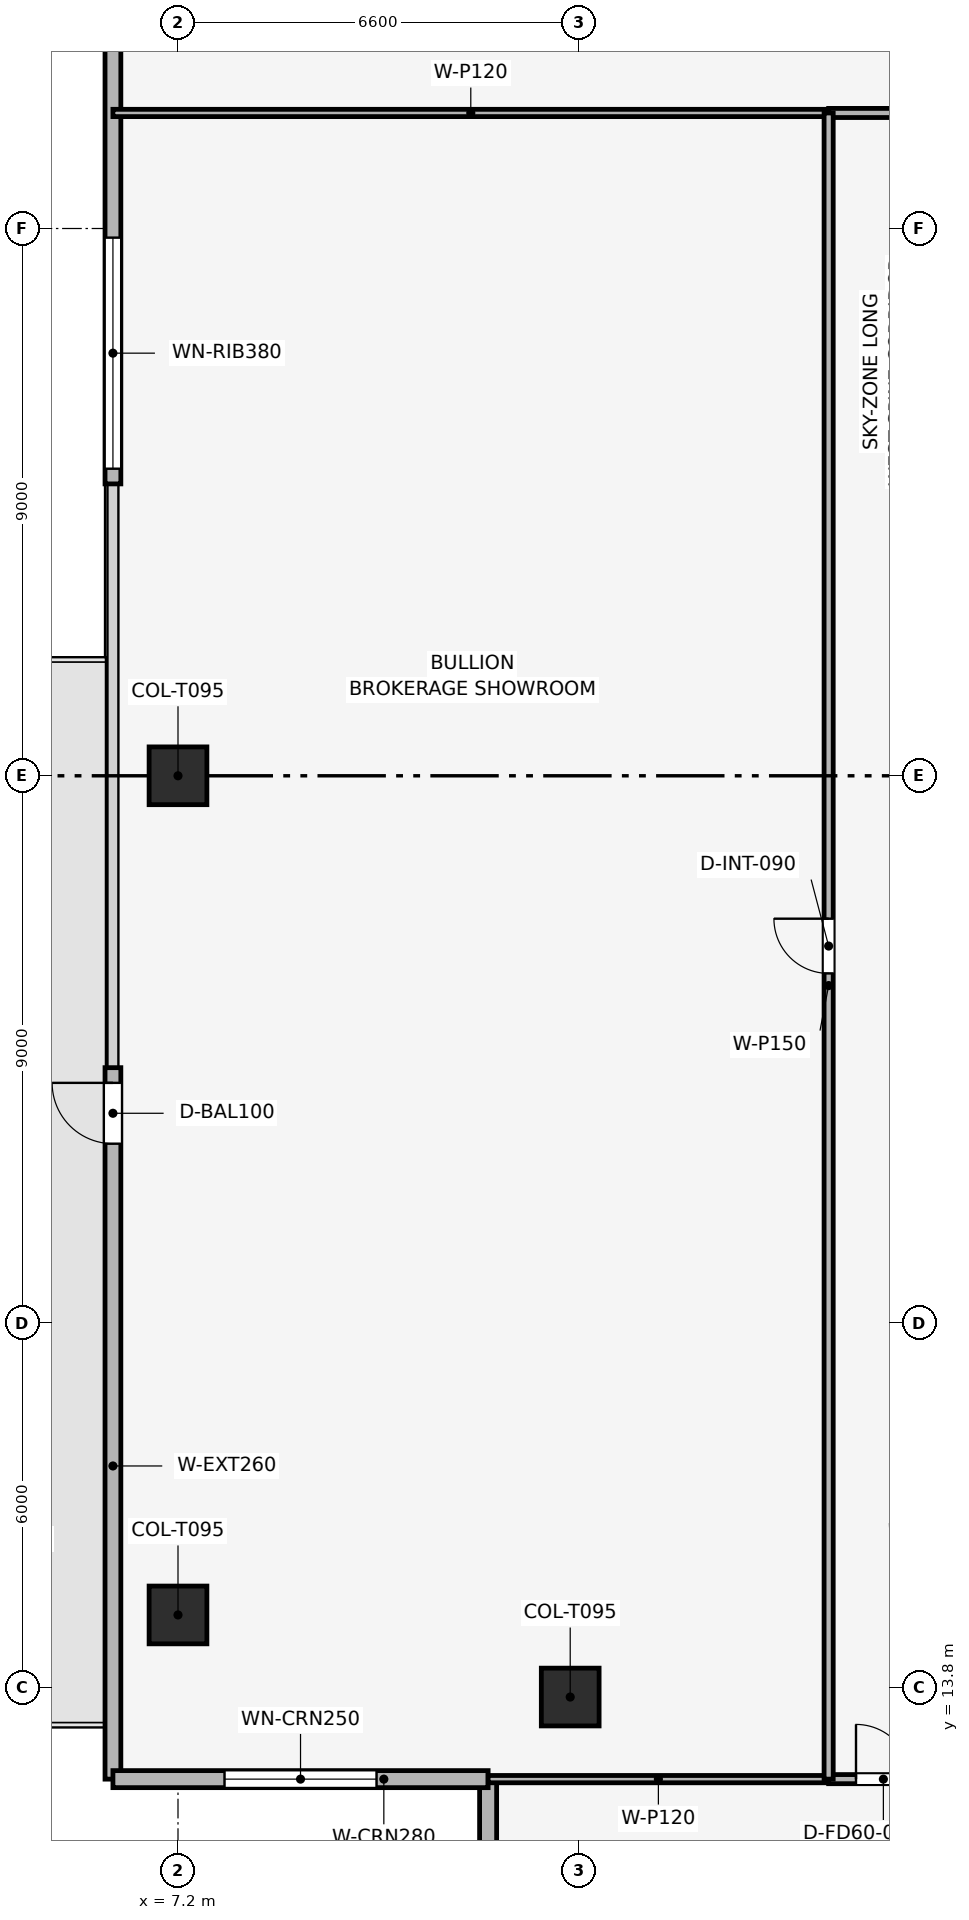
"""IFC4 building model, lengths in metres.
Left out: names, types, materials, properties, quantities, classifications, styles, units other than length and angle.
Written with IfcOpenShell. Run it as: python <this file> out.ifc"""

import sys

from ifc_helpers import new_model, si_unit, direction, frame, frame_2d, origin, origin_2d, place, context, subcontext, project, spatial, rectangle, extrude, element, fill, save


model = new_model("IFC4")
c1 = context("Model", 3, precision=1e-05, world=origin(), true_north=direction((0.0, 1.0)))
c2 = subcontext(c1, "Body", "Model", "MODEL_VIEW")
j1 = project(units=[si_unit("LENGTHUNIT", "METRE"), si_unit("PLANEANGLEUNIT", "RADIAN")], contexts=[c1])
p1 = place(None, origin())
s1 = spatial("IfcSite", under=j1, at=p1, CompositionType="ELEMENT")
p2 = place(p1, origin())
s2 = spatial("IfcBuilding", under=s1, at=p2, CompositionType="ELEMENT")
p3 = place(p2, frame((0.0, 0.0, 318.0)))
s3 = spatial("IfcBuildingStorey", under=s2, at=p3, CompositionType="ELEMENT", Elevation=318.0)
for number, where, z_axis, x_axis in (
    (1, (7.2, 28.8, 0.003), (0.0, 0.0, 1.0), (1.0, 0.0, 0.0)),
    (2, (7.2, 15.0, 0.003), (0.0, 0.0, 1.0), (1.0, 0.0, 0.0)),
    (3, (13.65, 13.65, 0.003), (0.0, 0.0, 1.0), (1.0, 0.0, 0.0)),
):
    element("IfcColumn", number, at=place(p3, frame(where, z_axis=z_axis, x_axis=x_axis)), inside=s3, PredefinedType="COLUMN", context=c2, shape_type="SweptSolid", body=[
        extrude(rectangle(XDim=0.95, YDim=0.95, at=origin_2d()), origin(), (0.0, 0.0, 1.0), 3.504),
    ])
p4 = place(p3, frame((6.13, 12.3, 0.0), z_axis=(0.0, 0.0, 1.0), x_axis=(0.0, 1.0, 0.0)))
e4 = element("IfcWall", 4, at=p4, inside=s3, PredefinedType="SOLIDWALL", context=c2, shape_type="SweptSolid", body=[
    extrude(rectangle(XDim=11.7, YDim=0.26, at=frame_2d((5.85, 0.0))), origin(), (0.0, 0.0, 1.0), 3.51),
])
p5 = place(p4, frame((10.45, 0.0, 0.0)))
e5 = element("IfcOpeningElement", 5, at=p5, cuts=e4, PredefinedType="OPENING", context=c2, shape_type="SweptSolid", body=[
    extrude(rectangle(XDim=1.0, YDim=2.2, at=frame_2d((0.5, 1.1))), frame((0.0, 0.14, 0.0), z_axis=(0.0, -1.0, 0.0), x_axis=(1.0, 0.0, 0.0)), (0.0, 0.0, 1.0), 0.28),
])
p6 = place(p3, frame((6.13, 33.6, 0.0), z_axis=(0.0, 0.0, 1.0), x_axis=(0.0, 1.0, 0.0)))
e6 = element("IfcWall", 6, at=p6, inside=s3, PredefinedType="SOLIDWALL", context=c2, shape_type="SweptSolid", body=[
    extrude(rectangle(XDim=11.7, YDim=0.26, at=frame_2d((5.85, 0.0))), origin(), (0.0, 0.0, 1.0), 3.51),
])
p7 = place(p6, frame((0.25, 0.0, 0.9)))
e7 = element("IfcOpeningElement", 7, at=p7, cuts=e6, PredefinedType="OPENING", context=c2, shape_type="SweptSolid", body=[
    extrude(rectangle(XDim=3.8, YDim=1.9, at=frame_2d((1.9, 0.95))), frame((0.0, 0.14, 0.0), z_axis=(0.0, -1.0, 0.0), x_axis=(1.0, 0.0, 0.0)), (0.0, 0.0, 1.0), 0.28),
])
p8 = place(p3, frame((12.3, 6.13, 0.0), z_axis=(0.0, 0.0, 1.0), x_axis=(0.0, 1.0, 0.0)))
e8 = element("IfcWall", 8, at=p8, inside=s3, PredefinedType="SOLIDWALL", context=c2, shape_type="SweptSolid", body=[
    extrude(rectangle(XDim=6.17, YDim=0.28, at=frame_2d((3.085, 0.0))), origin(), (0.0, 0.0, 1.0), 3.51),
])
p9 = place(p8, frame((1.835, 0.0, 0.9)))
e9 = element("IfcOpeningElement", 9, at=p9, cuts=e8, PredefinedType="OPENING", context=c2, shape_type="SweptSolid", body=[
    extrude(rectangle(XDim=2.5, YDim=1.9, at=frame_2d((1.25, 0.95))), frame((0.0, 0.15, 0.0), z_axis=(0.0, -1.0, 0.0), x_axis=(1.0, 0.0, 0.0)), (0.0, 0.0, 1.0), 0.3),
])
p10 = place(p3, frame((12.3, 12.3, 0.0), z_axis=(0.0, 0.0, 1.0), x_axis=(-1.0, 0.0, 0.0)))
e10 = element("IfcWall", 10, at=p10, inside=s3, PredefinedType="SOLIDWALL", context=c2, shape_type="SweptSolid", body=[
    extrude(rectangle(XDim=6.17, YDim=0.28, at=frame_2d((3.085, 0.0))), origin(), (0.0, 0.0, 1.0), 3.51),
])
p11 = place(p10, frame((1.835, 0.0, 0.9)))
e11 = element("IfcOpeningElement", 11, at=p11, cuts=e10, PredefinedType="OPENING", context=c2, shape_type="SweptSolid", body=[
    extrude(rectangle(XDim=2.5, YDim=1.9, at=frame_2d((1.25, 0.95))), frame((0.0, 0.15, 0.0), z_axis=(0.0, -1.0, 0.0), x_axis=(1.0, 0.0, 0.0)), (0.0, 0.0, 1.0), 0.3),
])
p12 = place(p3, frame((12.3, 12.3, 0.0), z_axis=(0.0, 0.0, 1.0), x_axis=(1.0, 0.0, 0.0)))
e12 = element("IfcWall", 12, at=p12, inside=s3, PredefinedType="PARTITIONING", context=c2, shape_type="SweptSolid", body=[
    extrude(rectangle(XDim=5.6, YDim=0.12, at=frame_2d((2.8, 0.0))), origin(), (0.0, 0.0, 1.0), 3.195),
])
p13 = place(p3, frame((17.9, 12.3, 0.0), z_axis=(0.0, 0.0, 1.0), x_axis=(1.0, 0.0, 0.0)))
e13 = element("IfcWall", 13, at=p13, inside=s3, PredefinedType="PARTITIONING", context=c2, shape_type="SweptSolid", body=[
    extrude(rectangle(XDim=1.9, YDim=0.15, at=frame_2d((0.95, 0.0))), origin(), (0.0, 0.0, 1.0), 3.51),
])
p14 = place(p13, frame((0.45, 0.0, 0.0)))
e14 = element("IfcOpeningElement", 14, at=p14, cuts=e13, PredefinedType="OPENING", context=c2, shape_type="SweptSolid", body=[
    extrude(rectangle(XDim=0.9, YDim=2.1, at=frame_2d((0.45, 1.05))), frame((0.0, 0.085, 0.0), z_axis=(0.0, -1.0, 0.0), x_axis=(1.0, 0.0, 0.0)), (0.0, 0.0, 1.0), 0.17),
])
p15 = place(p3, frame((6.13, 39.7, 0.0), z_axis=(0.0, 0.0, 1.0), x_axis=(1.0, 0.0, 0.0)))
e15 = element("IfcWall", 15, at=p15, inside=s3, PredefinedType="PARTITIONING", context=c2, shape_type="SweptSolid", body=[
    extrude(rectangle(XDim=11.77, YDim=0.12, at=frame_2d((5.885, 0.0))), origin(), (0.0, 0.0, 1.0), 3.095),
])
p16 = place(p3, frame((17.9, 39.7, 0.0), z_axis=(0.0, 0.0, 1.0), x_axis=(1.0, 0.0, 0.0)))
e16 = element("IfcWall", 16, at=p16, inside=s3, PredefinedType="PARTITIONING", context=c2, shape_type="SweptSolid", body=[
    extrude(rectangle(XDim=21.8, YDim=0.15, at=frame_2d((10.9, 0.0))), origin(), (0.0, 0.0, 1.0), 3.095),
])
p17 = place(p16, frame((2.1, 0.0, 0.0)))
e17 = element("IfcOpeningElement", 17, at=p17, cuts=e16, PredefinedType="OPENING", context=c2, shape_type="SweptSolid", body=[
    extrude(rectangle(XDim=0.9, YDim=2.1, at=frame_2d((0.45, 1.05))), frame((0.0, 0.085, 0.0), z_axis=(0.0, -1.0, 0.0), x_axis=(1.0, 0.0, 0.0)), (0.0, 0.0, 1.0), 0.17),
])
p18 = place(p16, frame((6.05, 0.0, 0.0)))
e18 = element("IfcOpeningElement", 18, at=p18, cuts=e16, PredefinedType="OPENING", context=c2, shape_type="SweptSolid", body=[
    extrude(rectangle(XDim=0.9, YDim=2.1, at=frame_2d((0.45, 1.05))), frame((0.0, 0.085, 0.0), z_axis=(0.0, -1.0, 0.0), x_axis=(1.0, 0.0, 0.0)), (0.0, 0.0, 1.0), 0.17),
])
p19 = place(p16, frame((8.95, 0.0, 0.0)))
e19 = element("IfcOpeningElement", 19, at=p19, cuts=e16, PredefinedType="OPENING", context=c2, shape_type="SweptSolid", body=[
    extrude(rectangle(XDim=0.9, YDim=2.1, at=frame_2d((0.45, 1.05))), frame((0.0, 0.085, 0.0), z_axis=(0.0, -1.0, 0.0), x_axis=(1.0, 0.0, 0.0)), (0.0, 0.0, 1.0), 0.17),
])
p20 = place(p16, frame((11.7, 0.0, 0.0)))
e20 = element("IfcOpeningElement", 20, at=p20, cuts=e16, PredefinedType="OPENING", context=c2, shape_type="SweptSolid", body=[
    extrude(rectangle(XDim=0.95, YDim=2.1, at=frame_2d((0.475, 1.05))), frame((0.0, 0.085, 0.0), z_axis=(0.0, -1.0, 0.0), x_axis=(1.0, 0.0, 0.0)), (0.0, 0.0, 1.0), 0.17),
])
p21 = place(p16, frame((17.2, 0.0, 0.0)))
e21 = element("IfcOpeningElement", 21, at=p21, cuts=e16, PredefinedType="OPENING", context=c2, shape_type="SweptSolid", body=[
    extrude(rectangle(XDim=0.9, YDim=2.1, at=frame_2d((0.45, 1.05))), frame((0.0, 0.085, 0.0), z_axis=(0.0, -1.0, 0.0), x_axis=(1.0, 0.0, 0.0)), (0.0, 0.0, 1.0), 0.17),
])
p22 = place(p3, frame((17.9, 12.3, 0.0), z_axis=(0.0, 0.0, 1.0), x_axis=(0.0, 1.0, 0.0)))
e22 = element("IfcWall", 22, at=p22, inside=s3, PredefinedType="PARTITIONING", context=c2, shape_type="SweptSolid", body=[
    extrude(rectangle(XDim=27.4, YDim=0.15, at=frame_2d((13.7, 0.0))), origin(), (0.0, 0.0, 1.0), 3.095),
])
p23 = place(p22, frame((13.25, 0.0, 0.0)))
e23 = element("IfcOpeningElement", 23, at=p23, cuts=e22, PredefinedType="OPENING", context=c2, shape_type="SweptSolid", body=[
    extrude(rectangle(XDim=0.9, YDim=2.1, at=frame_2d((0.45, 1.05))), frame((0.0, 0.085, 0.0), z_axis=(0.0, -1.0, 0.0), x_axis=(1.0, 0.0, 0.0)), (0.0, 0.0, 1.0), 0.17),
])
p24 = place(p5, origin())
e24 = element("IfcDoor", 24, at=p24, inside=s3, OperationType="SINGLE_SWING_RIGHT", PredefinedType="DOOR", context=c2, shape_type="SweptSolid", body=[
    extrude(rectangle(XDim=1.0, YDim=2.2, at=frame_2d((0.5, 1.1))), frame((0.0, 0.025, 0.0), z_axis=(0.0, -1.0, 0.0), x_axis=(1.0, 0.0, 0.0)), (0.0, 0.0, 1.0), 0.05),
])
fill(e5, e24)
p25 = place(p7, origin())
e25 = element("IfcWindow", 25, at=p25, inside=s3, PartitioningType="SINGLE_PANEL", PredefinedType="WINDOW", context=c2, shape_type="SweptSolid", body=[
    extrude(rectangle(XDim=3.8, YDim=1.9, at=frame_2d((1.9, 0.95))), frame((0.0, 0.03, 0.0), z_axis=(0.0, -1.0, 0.0), x_axis=(1.0, 0.0, 0.0)), (0.0, 0.0, 1.0), 0.06),
])
fill(e7, e25)
p26 = place(p11, origin())
e26 = element("IfcWindow", 26, at=p26, inside=s3, PartitioningType="SINGLE_PANEL", PredefinedType="WINDOW", context=c2, shape_type="SweptSolid", body=[
    extrude(rectangle(XDim=2.5, YDim=1.9, at=frame_2d((1.25, 0.95))), frame((0.0, 0.03, 0.0), z_axis=(0.0, -1.0, 0.0), x_axis=(1.0, 0.0, 0.0)), (0.0, 0.0, 1.0), 0.06),
])
fill(e11, e26)
p27 = place(p14, origin())
e27 = element("IfcDoor", 27, at=p27, inside=s3, OperationType="SINGLE_SWING_LEFT", PredefinedType="DOOR", context=c2, shape_type="SweptSolid", body=[
    extrude(rectangle(XDim=0.9, YDim=2.1, at=frame_2d((0.45, 1.05))), frame((0.0, 0.025, 0.0), z_axis=(0.0, -1.0, 0.0), x_axis=(1.0, 0.0, 0.0)), (0.0, 0.0, 1.0), 0.05),
])
fill(e14, e27)
p28 = place(p23, origin())
e28 = element("IfcDoor", 28, at=p28, inside=s3, OperationType="SINGLE_SWING_RIGHT", PredefinedType="DOOR", context=c2, shape_type="SweptSolid", body=[
    extrude(rectangle(XDim=0.9, YDim=2.1, at=frame_2d((0.45, 1.05))), frame((0.0, 0.025, 0.0), z_axis=(0.0, -1.0, 0.0), x_axis=(1.0, 0.0, 0.0)), (0.0, 0.0, 1.0), 0.05),
])
fill(e23, e28)
save(model, sys.argv[1])
